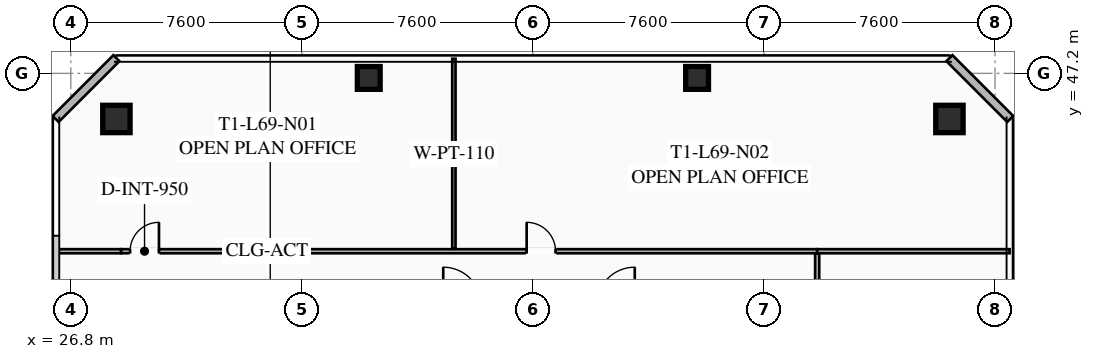
"""IFC4 building model, lengths in metres.
Left out: names, types, materials, properties, quantities, classifications, styles, units other than length and angle.
Written with IfcOpenShell. Run it as: python <this file> out.ifc"""

import sys

from ifc_helpers import new_model, si_unit, direction, frame, frame_2d, origin, origin_2d, place, context, subcontext, project, spatial, rectangle, hollow_rectangle, extrude, element, fill, save


model = new_model("IFC4")
c1 = context("Model", 3, precision=1e-05, world=origin(), true_north=direction((0.0, 1.0)))
c2 = subcontext(c1, "Body", "Model", "MODEL_VIEW")
j1 = project(units=[si_unit("LENGTHUNIT", "METRE"), si_unit("PLANEANGLEUNIT", "RADIAN")], contexts=[c1])
p1 = place(None, origin())
s1 = spatial("IfcSite", under=j1, at=p1, CompositionType="ELEMENT")
p2 = place(p1, origin())
s2 = spatial("IfcBuilding", under=s1, at=p2, CompositionType="ELEMENT")
p3 = place(p2, frame((0.0, 0.0, 255.4)))
s3 = spatial("IfcBuildingStorey", under=s2, at=p3, CompositionType="ELEMENT", Elevation=255.4)
for number, where, z_axis, x_axis in (
    (1, (55.7, 45.7, 0.0), (0.0, 0.0, 1.0), (1.0, 0.0, 0.0)),
    (2, (28.3, 45.7, 0.0), (0.0, 0.0, 1.0), (1.0, 0.0, 0.0)),
):
    element("IfcColumn", number, at=place(p3, frame(where, z_axis=z_axis, x_axis=x_axis)), inside=s3, PredefinedType="COLUMN", context=c2, shape_type="SweptSolid", body=[
        extrude(hollow_rectangle(XDim=0.9, YDim=0.9, WallThickness=0.04, at=origin_2d()), origin(), (0.0, 0.0, 1.0), 3.78),
    ])
for number, where, z_axis, x_axis in (
    (3, (47.4, 47.05, 0.0), (0.0, 0.0, 1.0), (1.0, 0.0, 0.0)),
    (4, (36.6, 47.05, 0.0), (0.0, 0.0, 1.0), (1.0, 0.0, 0.0)),
):
    element("IfcColumn", number, at=place(p3, frame(where, z_axis=z_axis, x_axis=x_axis)), inside=s3, PredefinedType="COLUMN", context=c2, shape_type="SweptSolid", body=[
        extrude(hollow_rectangle(XDim=0.75, YDim=0.75, WallThickness=0.032, at=origin_2d()), origin(), (0.0, 0.0, 1.0), 3.78),
    ])
for number, where, z_axis, x_axis in (
    (5, (26.3, 45.7, 0.0), (0.0, 0.0, 1.0), (0.707, 0.707, 0.0)),
    (6, (55.7, 47.7, 0.0), (0.0, 0.0, 1.0), (0.707, -0.707, 0.0)),
):
    element("IfcWall", number, at=place(p3, frame(where, z_axis=z_axis, x_axis=x_axis)), inside=s3, PredefinedType="SOLIDWALL", context=c2, shape_type="SweptSolid", body=[
        extrude(rectangle(XDim=2.828, YDim=0.28, at=frame_2d((1.414, 0.0))), origin(), (0.0, 0.0, 1.0), 3.78),
    ])
p4 = place(p3, frame((28.45, 41.35, 0.0), z_axis=(0.0, 0.0, 1.0), x_axis=(1.0, 0.0, 0.0)))
e7 = element("IfcWall", 7, at=p4, inside=s3, PredefinedType="PARTITIONING", context=c2, shape_type="SweptSolid", body=[
    extrude(rectangle(XDim=22.9, YDim=0.135, at=frame_2d((11.45, 0.0))), origin(), (0.0, 0.0, 1.0), 2.971),
])
p5 = place(p4, frame((0.3, 0.0, 0.0)))
e8 = element("IfcOpeningElement", 8, at=p5, cuts=e7, PredefinedType="OPENING", context=c2, shape_type="SweptSolid", body=[
    extrude(rectangle(XDim=0.95, YDim=2.05, at=frame_2d((0.475, 1.025))), frame((0.0, 0.077, 0.0), z_axis=(0.0, -1.0, 0.0), x_axis=(1.0, 0.0, 0.0)), (0.0, 0.0, 1.0), 0.155),
])
p6 = place(p4, frame((13.344, 0.0, 0.0)))
e9 = element("IfcOpeningElement", 9, at=p6, cuts=e7, PredefinedType="OPENING", context=c2, shape_type="SweptSolid", body=[
    extrude(rectangle(XDim=0.95, YDim=2.05, at=frame_2d((0.475, 1.025))), frame((0.0, 0.077, 0.0), z_axis=(0.0, -1.0, 0.0), x_axis=(1.0, 0.0, 0.0)), (0.0, 0.0, 1.0), 0.155),
])
p7 = place(p3, frame((26.32, 41.35, 0.0), z_axis=(0.0, 0.0, 1.0), x_axis=(1.0, 0.0, 0.0)))
e10 = element("IfcWall", 10, at=p7, inside=s3, PredefinedType="PARTITIONING", context=c2, shape_type="SweptSolid", body=[
    extrude(rectangle(XDim=2.13, YDim=0.135, at=frame_2d((1.065, 0.0))), origin(), (0.0, 0.0, 1.0), 2.971),
])
p8 = place(p3, frame((51.35, 41.35, 0.0), z_axis=(0.0, 0.0, 1.0), x_axis=(1.0, 0.0, 0.0)))
e11 = element("IfcWall", 11, at=p8, inside=s3, PredefinedType="PARTITIONING", context=c2, shape_type="SweptSolid", body=[
    extrude(rectangle(XDim=6.33, YDim=0.135, at=frame_2d((3.165, 0.0))), origin(), (0.0, 0.0, 1.0), 2.971),
])
p9 = place(p3, frame((39.4, 41.43, 0.0), z_axis=(0.0, 0.0, 1.0), x_axis=(0.0, 1.0, 0.0)))
e12 = element("IfcWall", 12, at=p9, inside=s3, PredefinedType="PARTITIONING", context=c2, shape_type="SweptSolid", body=[
    extrude(rectangle(XDim=6.25, YDim=0.11, at=frame_2d((3.125, 0.0))), origin(), (0.0, 0.0, 1.0), 2.971),
])
p10 = place(p3, frame((51.35, 41.27, 0.0), z_axis=(0.0, 0.0, 1.0), x_axis=(0.0, -1.0, 0.0)))
e13 = element("IfcWall", 13, at=p10, inside=s3, PredefinedType="PARTITIONING", context=c2, shape_type="SweptSolid", body=[
    extrude(rectangle(XDim=8.79, YDim=0.135, at=frame_2d((4.395, 0.0))), origin(), (0.0, 0.0, 1.0), 2.971),
])
p11 = place(p10, frame((2.1, 0.0, 0.0)))
e14 = element("IfcOpeningElement", 14, at=p11, cuts=e13, PredefinedType="OPENING", context=c2, shape_type="SweptSolid", body=[
    extrude(rectangle(XDim=0.95, YDim=2.05, at=frame_2d((0.475, 1.025))), frame((0.0, 0.077, 0.0), z_axis=(0.0, -1.0, 0.0), x_axis=(1.0, 0.0, 0.0)), (0.0, 0.0, 1.0), 0.155),
])
p12 = place(p5, origin())
e15 = element("IfcDoor", 15, at=p12, inside=s3, OperationType="SINGLE_SWING_RIGHT", PredefinedType="DOOR", context=c2, shape_type="SweptSolid", body=[
    extrude(rectangle(XDim=0.95, YDim=2.05, at=frame_2d((0.475, 1.025))), frame((0.0, 0.025, 0.0), z_axis=(0.0, -1.0, 0.0), x_axis=(1.0, 0.0, 0.0)), (0.0, 0.0, 1.0), 0.05),
])
fill(e8, e15)
p13 = place(p6, origin())
e16 = element("IfcDoor", 16, at=p13, inside=s3, OperationType="SINGLE_SWING_LEFT", PredefinedType="DOOR", context=c2, shape_type="SweptSolid", body=[
    extrude(rectangle(XDim=0.95, YDim=2.05, at=frame_2d((0.475, 1.025))), frame((0.0, 0.025, 0.0), z_axis=(0.0, -1.0, 0.0), x_axis=(1.0, 0.0, 0.0)), (0.0, 0.0, 1.0), 0.05),
])
fill(e9, e16)
save(model, sys.argv[1])
